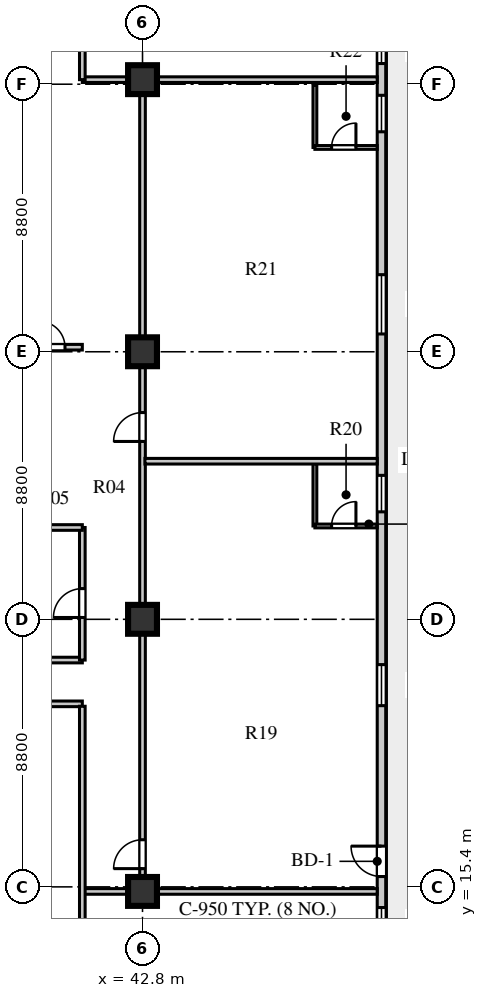
"""IFC4 building model, lengths in metres.
Left out: names, types, materials, properties, quantities, classifications, styles, units other than length and angle.
Written with IfcOpenShell. Run it as: python <this file> out.ifc"""

import sys

from ifc_helpers import new_model, si_unit, direction, frame, frame_2d, origin, origin_2d, place, context, subcontext, project, spatial, rectangle, extrude, element, fill, save


model = new_model("IFC4")
c1 = context("Model", 3, precision=1e-05, world=origin(), true_north=direction((0.0, 1.0)))
c2 = subcontext(c1, "Body", "Model", "MODEL_VIEW")
j1 = project(units=[si_unit("LENGTHUNIT", "METRE"), si_unit("PLANEANGLEUNIT", "RADIAN")], contexts=[c1])
p1 = place(None, origin())
s1 = spatial("IfcSite", under=j1, at=p1, CompositionType="ELEMENT")
p2 = place(p1, origin())
s2 = spatial("IfcBuilding", under=s1, at=p2, CompositionType="ELEMENT")
p3 = place(p2, frame((0.0, 0.0, 157.9)))
s3 = spatial("IfcBuildingStorey", under=s2, at=p3, CompositionType="ELEMENT", Elevation=157.9)
for number, where, z_axis, x_axis in (
    (1, (42.8, 15.25, 0.0), (0.0, 0.0, 1.0), (1.0, 0.0, 0.0)),
    (2, (42.8, 24.2, 0.0), (0.0, 0.0, 1.0), (1.0, 0.0, 0.0)),
    (3, (42.8, 33.0, 0.0), (0.0, 0.0, 1.0), (1.0, 0.0, 0.0)),
    (4, (42.8, 41.95, 0.0), (0.0, 0.0, 1.0), (1.0, 0.0, 0.0)),
):
    element("IfcColumn", number, at=place(p3, frame(where, z_axis=z_axis, x_axis=x_axis)), inside=s3, PredefinedType="COLUMN", context=c2, shape_type="SweptSolid", body=[
        extrude(rectangle(XDim=0.95, YDim=0.95, at=origin_2d()), origin(), (0.0, 0.0, 1.0), 3.6),
    ])
p4 = place(p3, frame((50.66, 13.13, 0.0), z_axis=(0.0, 0.0, 1.0), x_axis=(0.0, 1.0, 0.0)))
e5 = element("IfcWall", 5, at=p4, inside=s3, PredefinedType="STANDARD", context=c2, shape_type="SweptSolid", body=[
    extrude(rectangle(XDim=30.94, YDim=0.28, at=frame_2d((15.47, 0.0))), origin(), (0.0, 0.0, 1.0), 3.6),
])
p5 = place(p4, frame((0.64, 0.0, 0.8)))
e6 = element("IfcOpeningElement", 6, at=p5, cuts=e5, PredefinedType="OPENING", context=c2, shape_type="SweptSolid", body=[
    extrude(rectangle(XDim=0.95, YDim=1.65, at=frame_2d((0.475, 0.825))), frame((0.0, 0.15, 0.0), z_axis=(0.0, -1.0, 0.0), x_axis=(1.0, 0.0, 0.0)), (0.0, 0.0, 1.0), 0.3),
])
p6 = place(p4, frame((2.61, 0.0, 0.0)))
e7 = element("IfcOpeningElement", 7, at=p6, cuts=e5, PredefinedType="OPENING", context=c2, shape_type="SweptSolid", body=[
    extrude(rectangle(XDim=1.0, YDim=2.05, at=frame_2d((0.5, 1.025))), frame((0.0, 0.15, 0.0), z_axis=(0.0, -1.0, 0.0), x_axis=(1.0, 0.0, 0.0)), (0.0, 0.0, 1.0), 0.3),
])
p7 = place(p4, frame((8.23, 0.0, 0.8)))
e8 = element("IfcOpeningElement", 8, at=p7, cuts=e5, PredefinedType="OPENING", context=c2, shape_type="SweptSolid", body=[
    extrude(rectangle(XDim=1.35, YDim=1.9, at=frame_2d((0.675, 0.95))), frame((0.0, 0.15, 0.0), z_axis=(0.0, -1.0, 0.0), x_axis=(1.0, 0.0, 0.0)), (0.0, 0.0, 1.0), 0.3),
])
p8 = place(p4, frame((14.605, 0.0, 0.8)))
e9 = element("IfcOpeningElement", 9, at=p8, cuts=e5, PredefinedType="OPENING", context=c2, shape_type="SweptSolid", body=[
    extrude(rectangle(XDim=1.2, YDim=1.75, at=frame_2d((0.6, 0.875))), frame((0.0, 0.15, 0.0), z_axis=(0.0, -1.0, 0.0), x_axis=(1.0, 0.0, 0.0)), (0.0, 0.0, 1.0), 0.3),
])
p9 = place(p4, frame((20.455, 0.0, 0.8)))
e10 = element("IfcOpeningElement", 10, at=p9, cuts=e5, PredefinedType="OPENING", context=c2, shape_type="SweptSolid", body=[
    extrude(rectangle(XDim=1.95, YDim=2.0, at=frame_2d((0.975, 1.0))), frame((0.0, 0.15, 0.0), z_axis=(0.0, -1.0, 0.0), x_axis=(1.0, 0.0, 0.0)), (0.0, 0.0, 1.0), 0.3),
])
p10 = place(p4, frame((27.105, 0.0, 0.8)))
e11 = element("IfcOpeningElement", 11, at=p10, cuts=e5, PredefinedType="OPENING", context=c2, shape_type="SweptSolid", body=[
    extrude(rectangle(XDim=1.2, YDim=1.75, at=frame_2d((0.6, 0.875))), frame((0.0, 0.15, 0.0), z_axis=(0.0, -1.0, 0.0), x_axis=(1.0, 0.0, 0.0)), (0.0, 0.0, 1.0), 0.3),
])
p11 = place(p4, frame((29.35, 0.0, 0.8)))
e12 = element("IfcOpeningElement", 12, at=p11, cuts=e5, PredefinedType="OPENING", context=c2, shape_type="SweptSolid", body=[
    extrude(rectangle(XDim=0.95, YDim=1.65, at=frame_2d((0.475, 0.825))), frame((0.0, 0.15, 0.0), z_axis=(0.0, -1.0, 0.0), x_axis=(1.0, 0.0, 0.0)), (0.0, 0.0, 1.0), 0.3),
])
p12 = place(p3, frame((25.22, 21.42, 0.0), z_axis=(0.0, 0.0, 1.0), x_axis=(1.0, 0.0, 0.0)))
e13 = element("IfcWall", 13, at=p12, inside=s3, PredefinedType="SOLIDWALL", context=c2, shape_type="SweptSolid", body=[
    extrude(rectangle(XDim=15.6, YDim=0.185, at=frame_2d((7.8, 0.0))), origin(), (0.0, 0.0, 1.0), 3.25),
])
p13 = place(p12, frame((0.73, 0.0, 0.0)))
e14 = element("IfcOpeningElement", 14, at=p13, cuts=e13, PredefinedType="OPENING", context=c2, shape_type="SweptSolid", body=[
    extrude(rectangle(XDim=0.95, YDim=2.1, at=frame_2d((0.475, 1.05))), frame((0.0, 0.103, 0.0), z_axis=(0.0, -1.0, 0.0), x_axis=(1.0, 0.0, 0.0)), (0.0, 0.0, 1.0), 0.205),
])
p14 = place(p3, frame((27.15, 22.86, 0.0), z_axis=(0.0, 0.0, 1.0), x_axis=(1.0, 0.0, 0.0)))
e15 = element("IfcWall", 15, at=p14, inside=s3, PredefinedType="SOLIDWALL", context=c2, shape_type="SweptSolid", body=[
    extrude(rectangle(XDim=13.67, YDim=0.185, at=frame_2d((6.835, 0.0))), origin(), (0.0, 0.0, 1.0), 3.6),
])
p15 = place(p14, frame((2.2, 0.0, 0.0)))
e16 = element("IfcOpeningElement", 16, at=p15, cuts=e15, PredefinedType="OPENING", context=c2, shape_type="SweptSolid", body=[
    extrude(rectangle(XDim=0.9, YDim=2.08, at=frame_2d((0.45, 1.04))), frame((0.0, 0.103, 0.0), z_axis=(0.0, -1.0, 0.0), x_axis=(1.0, 0.0, 0.0)), (0.0, 0.0, 1.0), 0.205),
])
p16 = place(p3, frame((42.8, 15.25, 0.0), z_axis=(0.0, 0.0, 1.0), x_axis=(0.0, 1.0, 0.0)))
e17 = element("IfcWall", 17, at=p16, inside=s3, PredefinedType="SOLIDWALL", context=c2, shape_type="SweptSolid", body=[
    extrude(rectangle(XDim=26.7, YDim=0.185, at=frame_2d((13.35, 0.0))), origin(), (0.0, 0.0, 1.0), 2.95),
])
p17 = place(p16, frame((0.75, 0.0, 0.0)))
e18 = element("IfcOpeningElement", 18, at=p17, cuts=e17, PredefinedType="OPENING", context=c2, shape_type="SweptSolid", body=[
    extrude(rectangle(XDim=0.95, YDim=2.1, at=frame_2d((0.475, 1.05))), frame((0.0, 0.103, 0.0), z_axis=(0.0, -1.0, 0.0), x_axis=(1.0, 0.0, 0.0)), (0.0, 0.0, 1.0), 0.205),
])
p18 = place(p16, frame((14.8, 0.0, 0.0)))
e19 = element("IfcOpeningElement", 19, at=p18, cuts=e17, PredefinedType="OPENING", context=c2, shape_type="SweptSolid", body=[
    extrude(rectangle(XDim=0.95, YDim=2.1, at=frame_2d((0.475, 1.05))), frame((0.0, 0.103, 0.0), z_axis=(0.0, -1.0, 0.0), x_axis=(1.0, 0.0, 0.0)), (0.0, 0.0, 1.0), 0.205),
])
for number, where, z_axis, x_axis in (
    (20, (40.82, 15.25, 0.0), (0.0, 0.0, 1.0), (1.0, 0.0, 0.0)),
    (21, (40.82, 41.95, 0.0), (0.0, 0.0, 1.0), (1.0, 0.0, 0.0)),
):
    element("IfcWall", number, at=place(p3, frame(where, z_axis=z_axis, x_axis=x_axis)), inside=s3, PredefinedType="SOLIDWALL", context=c2, shape_type="SweptSolid", body=[
        extrude(rectangle(XDim=9.7, YDim=0.185, at=frame_2d((4.85, 0.0))), origin(), (0.0, 0.0, 1.0), 2.95),
    ])
p19 = place(p3, frame((40.82, 22.86, 0.0), z_axis=(0.0, 0.0, 1.0), x_axis=(0.0, 1.0, 0.0)))
e22 = element("IfcWall", 22, at=p19, inside=s3, PredefinedType="SOLIDWALL", context=c2, shape_type="SweptSolid", body=[
    extrude(rectangle(XDim=4.36, YDim=0.185, at=frame_2d((2.18, 0.0))), origin(), (0.0, 0.0, 1.0), 3.6),
])
p20 = place(p19, frame((1.4, 0.0, 0.0)))
e23 = element("IfcOpeningElement", 23, at=p20, cuts=e22, PredefinedType="OPENING", context=c2, shape_type="SweptSolid", body=[
    extrude(rectangle(XDim=0.95, YDim=2.1, at=frame_2d((0.475, 1.05))), frame((0.0, 0.103, 0.0), z_axis=(0.0, -1.0, 0.0), x_axis=(1.0, 0.0, 0.0)), (0.0, 0.0, 1.0), 0.205),
])
p21 = place(p3, frame((36.9, 27.22, 0.0), z_axis=(0.0, 0.0, 1.0), x_axis=(1.0, 0.0, 0.0)))
e24 = element("IfcWall", 24, at=p21, inside=s3, PredefinedType="SOLIDWALL", context=c2, shape_type="SweptSolid", body=[
    extrude(rectangle(XDim=3.92, YDim=0.185, at=frame_2d((1.96, 0.0))), origin(), (0.0, 0.0, 1.0), 3.25),
])
p22 = place(p3, frame((40.82, 7.88, 0.0), z_axis=(0.0, 0.0, 1.0), x_axis=(0.0, 1.0, 0.0)))
e25 = element("IfcWall", 25, at=p22, inside=s3, PredefinedType="SOLIDWALL", context=c2, shape_type="SweptSolid", body=[
    extrude(rectangle(XDim=13.46, YDim=0.185, at=frame_2d((6.73, 0.0))), origin(), (0.0, 0.0, 1.0), 3.6),
])
p23 = place(p3, frame((48.47, 27.27, 0.0), z_axis=(0.0, 0.0, 1.0), x_axis=(0.0, 1.0, 0.0)))
e26 = element("IfcWall", 26, at=p23, inside=s3, PredefinedType="PLUMBINGWALL", context=c2, shape_type="SweptSolid", body=[
    extrude(rectangle(XDim=2.05, YDim=0.125, at=frame_2d((1.025, 0.0))), origin(), (0.0, 0.0, 1.0), 3.6),
])
p24 = place(p3, frame((48.47, 27.27, 0.0), z_axis=(0.0, 0.0, 1.0), x_axis=(1.0, 0.0, 0.0)))
e27 = element("IfcWall", 27, at=p24, inside=s3, PredefinedType="PLUMBINGWALL", context=c2, shape_type="SweptSolid", body=[
    extrude(rectangle(XDim=2.05, YDim=0.125, at=frame_2d((1.025, 0.0))), origin(), (0.0, 0.0, 1.0), 3.6),
])
p25 = place(p24, frame((0.55, 0.0, 0.0)))
e28 = element("IfcOpeningElement", 28, at=p25, cuts=e27, PredefinedType="OPENING", context=c2, shape_type="SweptSolid", body=[
    extrude(rectangle(XDim=0.8, YDim=2.05, at=frame_2d((0.4, 1.025))), frame((0.0, 0.073, 0.0), z_axis=(0.0, -1.0, 0.0), x_axis=(1.0, 0.0, 0.0)), (0.0, 0.0, 1.0), 0.145),
])
p26 = place(p3, frame((42.88, 29.4, 0.0), z_axis=(0.0, 0.0, 1.0), x_axis=(1.0, 0.0, 0.0)))
e29 = element("IfcWall", 29, at=p26, inside=s3, PredefinedType="SOLIDWALL", context=c2, shape_type="SweptSolid", body=[
    extrude(rectangle(XDim=7.64, YDim=0.185, at=frame_2d((3.82, 0.0))), origin(), (0.0, 0.0, 1.0), 3.6),
])
p27 = place(p3, frame((48.47, 39.72, 0.0), z_axis=(0.0, 0.0, 1.0), x_axis=(0.0, 1.0, 0.0)))
e30 = element("IfcWall", 30, at=p27, inside=s3, PredefinedType="PLUMBINGWALL", context=c2, shape_type="SweptSolid", body=[
    extrude(rectangle(XDim=2.05, YDim=0.125, at=frame_2d((1.025, 0.0))), origin(), (0.0, 0.0, 1.0), 3.6),
])
p28 = place(p3, frame((48.47, 39.72, 0.0), z_axis=(0.0, 0.0, 1.0), x_axis=(1.0, 0.0, 0.0)))
e31 = element("IfcWall", 31, at=p28, inside=s3, PredefinedType="PLUMBINGWALL", context=c2, shape_type="SweptSolid", body=[
    extrude(rectangle(XDim=2.05, YDim=0.125, at=frame_2d((1.025, 0.0))), origin(), (0.0, 0.0, 1.0), 3.6),
])
p29 = place(p28, frame((0.55, 0.0, 0.0)))
e32 = element("IfcOpeningElement", 32, at=p29, cuts=e31, PredefinedType="OPENING", context=c2, shape_type="SweptSolid", body=[
    extrude(rectangle(XDim=0.8, YDim=2.05, at=frame_2d((0.4, 1.025))), frame((0.0, 0.073, 0.0), z_axis=(0.0, -1.0, 0.0), x_axis=(1.0, 0.0, 0.0)), (0.0, 0.0, 1.0), 0.145),
])
p30 = place(p3, frame((38.95, 33.15, 0.0), z_axis=(0.0, 0.0, 1.0), x_axis=(1.0, 0.0, 0.0)))
e33 = element("IfcWall", 33, at=p30, inside=s3, PredefinedType="SOLIDWALL", context=c2, shape_type="SweptSolid", body=[
    extrude(rectangle(XDim=1.87, YDim=0.185, at=frame_2d((0.935, 0.0))), origin(), (0.0, 0.0, 1.0), 3.6),
])
p31 = place(p30, frame((0.45, 0.0, 0.0)))
e34 = element("IfcOpeningElement", 34, at=p31, cuts=e33, PredefinedType="OPENING", context=c2, shape_type="SweptSolid", body=[
    extrude(rectangle(XDim=0.85, YDim=2.05, at=frame_2d((0.425, 1.025))), frame((0.0, 0.103, 0.0), z_axis=(0.0, -1.0, 0.0), x_axis=(1.0, 0.0, 0.0)), (0.0, 0.0, 1.0), 0.205),
])
p32 = place(p3, frame((40.82, 41.95, 0.0), z_axis=(0.0, 0.0, 1.0), x_axis=(0.0, 1.0, 0.0)))
e35 = element("IfcWall", 35, at=p32, inside=s3, PredefinedType="SOLIDWALL", context=c2, shape_type="SweptSolid", body=[
    extrude(rectangle(XDim=7.37, YDim=0.185, at=frame_2d((3.685, 0.0))), origin(), (0.0, 0.0, 1.0), 3.6),
])
p33 = place(p5, origin())
e36 = element("IfcWindow", 36, at=p33, inside=s3, PartitioningType="SINGLE_PANEL", PredefinedType="WINDOW", context=c2, shape_type="SweptSolid", body=[
    extrude(rectangle(XDim=0.95, YDim=1.65, at=frame_2d((0.475, 0.825))), frame((0.0, 0.03, 0.0), z_axis=(0.0, -1.0, 0.0), x_axis=(1.0, 0.0, 0.0)), (0.0, 0.0, 1.0), 0.06),
])
fill(e6, e36)
p34 = place(p6, frame((1.0, 0.0, 0.0), z_axis=(0.0, 0.0, 1.0), x_axis=(-1.0, 0.0, 0.0)))
e37 = element("IfcDoor", 37, at=p34, inside=s3, OperationType="SINGLE_SWING_LEFT", PredefinedType="DOOR", context=c2, shape_type="SweptSolid", body=[
    extrude(rectangle(XDim=1.0, YDim=2.05, at=frame_2d((0.5, 1.025))), frame((0.0, 0.025, 0.0), z_axis=(0.0, -1.0, 0.0), x_axis=(1.0, 0.0, 0.0)), (0.0, 0.0, 1.0), 0.05),
])
fill(e7, e37)
p35 = place(p7, origin())
e38 = element("IfcWindow", 38, at=p35, inside=s3, PartitioningType="SINGLE_PANEL", PredefinedType="WINDOW", context=c2, shape_type="SweptSolid", body=[
    extrude(rectangle(XDim=1.35, YDim=1.9, at=frame_2d((0.675, 0.95))), frame((0.0, 0.03, 0.0), z_axis=(0.0, -1.0, 0.0), x_axis=(1.0, 0.0, 0.0)), (0.0, 0.0, 1.0), 0.06),
])
fill(e8, e38)
p36 = place(p8, origin())
e39 = element("IfcWindow", 39, at=p36, inside=s3, PartitioningType="SINGLE_PANEL", PredefinedType="WINDOW", context=c2, shape_type="SweptSolid", body=[
    extrude(rectangle(XDim=1.2, YDim=1.75, at=frame_2d((0.6, 0.875))), frame((0.0, 0.03, 0.0), z_axis=(0.0, -1.0, 0.0), x_axis=(1.0, 0.0, 0.0)), (0.0, 0.0, 1.0), 0.06),
])
fill(e9, e39)
p37 = place(p9, origin())
e40 = element("IfcWindow", 40, at=p37, inside=s3, PartitioningType="SINGLE_PANEL", PredefinedType="WINDOW", context=c2, shape_type="SweptSolid", body=[
    extrude(rectangle(XDim=1.95, YDim=2.0, at=frame_2d((0.975, 1.0))), frame((0.0, 0.03, 0.0), z_axis=(0.0, -1.0, 0.0), x_axis=(1.0, 0.0, 0.0)), (0.0, 0.0, 1.0), 0.06),
])
fill(e10, e40)
p38 = place(p10, origin())
e41 = element("IfcWindow", 41, at=p38, inside=s3, PartitioningType="SINGLE_PANEL", PredefinedType="WINDOW", context=c2, shape_type="SweptSolid", body=[
    extrude(rectangle(XDim=1.2, YDim=1.75, at=frame_2d((0.6, 0.875))), frame((0.0, 0.03, 0.0), z_axis=(0.0, -1.0, 0.0), x_axis=(1.0, 0.0, 0.0)), (0.0, 0.0, 1.0), 0.06),
])
fill(e11, e41)
p39 = place(p11, origin())
e42 = element("IfcWindow", 42, at=p39, inside=s3, PartitioningType="SINGLE_PANEL", PredefinedType="WINDOW", context=c2, shape_type="SweptSolid", body=[
    extrude(rectangle(XDim=0.95, YDim=1.65, at=frame_2d((0.475, 0.825))), frame((0.0, 0.03, 0.0), z_axis=(0.0, -1.0, 0.0), x_axis=(1.0, 0.0, 0.0)), (0.0, 0.0, 1.0), 0.06),
])
fill(e12, e42)
p40 = place(p20, frame((0.95, 0.0, 0.0), z_axis=(0.0, 0.0, 1.0), x_axis=(-1.0, 0.0, 0.0)))
e43 = element("IfcDoor", 43, at=p40, inside=s3, OperationType="SINGLE_SWING_RIGHT", PredefinedType="DOOR", context=c2, shape_type="SweptSolid", body=[
    extrude(rectangle(XDim=0.95, YDim=2.1, at=frame_2d((0.475, 1.05))), frame((0.0, 0.025, 0.0), z_axis=(0.0, -1.0, 0.0), x_axis=(1.0, 0.0, 0.0)), (0.0, 0.0, 1.0), 0.05),
])
fill(e23, e43)
p41 = place(p17, origin())
e44 = element("IfcDoor", 44, at=p41, inside=s3, OperationType="SINGLE_SWING_LEFT", PredefinedType="DOOR", context=c2, shape_type="SweptSolid", body=[
    extrude(rectangle(XDim=0.95, YDim=2.1, at=frame_2d((0.475, 1.05))), frame((0.0, 0.025, 0.0), z_axis=(0.0, -1.0, 0.0), x_axis=(1.0, 0.0, 0.0)), (0.0, 0.0, 1.0), 0.05),
])
fill(e18, e44)
p42 = place(p25, frame((0.8, 0.0, 0.0), z_axis=(0.0, 0.0, 1.0), x_axis=(-1.0, 0.0, 0.0)))
e45 = element("IfcDoor", 45, at=p42, inside=s3, OperationType="SINGLE_SWING_LEFT", PredefinedType="DOOR", context=c2, shape_type="SweptSolid", body=[
    extrude(rectangle(XDim=0.8, YDim=2.05, at=frame_2d((0.4, 1.025))), frame((0.0, 0.025, 0.0), z_axis=(0.0, -1.0, 0.0), x_axis=(1.0, 0.0, 0.0)), (0.0, 0.0, 1.0), 0.05),
])
fill(e28, e45)
p43 = place(p18, origin())
e46 = element("IfcDoor", 46, at=p43, inside=s3, OperationType="SINGLE_SWING_LEFT", PredefinedType="DOOR", context=c2, shape_type="SweptSolid", body=[
    extrude(rectangle(XDim=0.95, YDim=2.1, at=frame_2d((0.475, 1.05))), frame((0.0, 0.025, 0.0), z_axis=(0.0, -1.0, 0.0), x_axis=(1.0, 0.0, 0.0)), (0.0, 0.0, 1.0), 0.05),
])
fill(e19, e46)
p44 = place(p29, frame((0.8, 0.0, 0.0), z_axis=(0.0, 0.0, 1.0), x_axis=(-1.0, 0.0, 0.0)))
e47 = element("IfcDoor", 47, at=p44, inside=s3, OperationType="SINGLE_SWING_LEFT", PredefinedType="DOOR", context=c2, shape_type="SweptSolid", body=[
    extrude(rectangle(XDim=0.8, YDim=2.05, at=frame_2d((0.4, 1.025))), frame((0.0, 0.025, 0.0), z_axis=(0.0, -1.0, 0.0), x_axis=(1.0, 0.0, 0.0)), (0.0, 0.0, 1.0), 0.05),
])
fill(e32, e47)
p45 = place(p31, origin())
e48 = element("IfcDoor", 48, at=p45, inside=s3, OperationType="SINGLE_SWING_LEFT", PredefinedType="DOOR", context=c2, shape_type="SweptSolid", body=[
    extrude(rectangle(XDim=0.85, YDim=2.05, at=frame_2d((0.425, 1.025))), frame((0.0, 0.025, 0.0), z_axis=(0.0, -1.0, 0.0), x_axis=(1.0, 0.0, 0.0)), (0.0, 0.0, 1.0), 0.05),
])
fill(e34, e48)
save(model, sys.argv[1])
